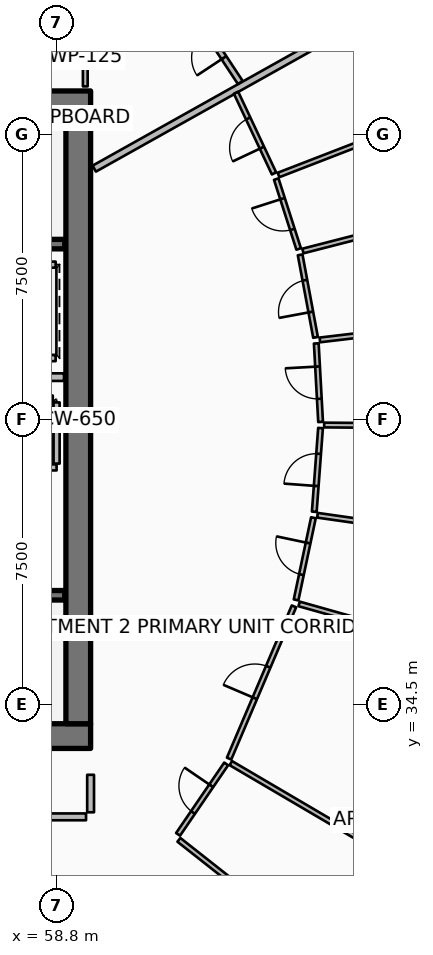
"""IFC4 building model, lengths in metres.
Left out: names, types, materials, properties, quantities, classifications, styles, units other than length and angle.
Written with IfcOpenShell. Run it as: python <this file> out.ifc"""

import sys

from ifc_helpers import new_model, si_unit, direction, frame, frame_2d, origin, place, context, subcontext, project, spatial, rectangle, extrude, element, fill, save


model = new_model("IFC4")
c1 = context("Model", 3, precision=1e-05, world=origin(), true_north=direction((0.0, 1.0)))
c2 = subcontext(c1, "Body", "Model", "MODEL_VIEW")
j1 = project(units=[si_unit("LENGTHUNIT", "METRE"), si_unit("PLANEANGLEUNIT", "RADIAN")], contexts=[c1])
p1 = place(None, origin())
s1 = spatial("IfcSite", under=j1, at=p1, CompositionType="ELEMENT")
p2 = place(p1, origin())
s2 = spatial("IfcBuilding", under=s1, at=p2, CompositionType="ELEMENT")
p3 = place(p2, frame((0.0, 0.0, 240.55)))
s3 = spatial("IfcBuildingStorey", under=s2, at=p3, CompositionType="ELEMENT", Elevation=240.55)
for number, where, z_axis, x_axis in (
    (1, (49.95, 33.675, 0.0), (0.0, 0.0, 1.0), (1.0, 0.0, 0.0)),
    (2, (49.95, 50.325, 0.0), (0.0, 0.0, 1.0), (1.0, 0.0, 0.0)),
):
    element("IfcWall", number, at=place(p3, frame(where, z_axis=z_axis, x_axis=x_axis)), inside=s3, PredefinedType="SHEAR", context=c2, shape_type="SweptSolid", body=[
        extrude(rectangle(XDim=9.75, YDim=0.65, at=frame_2d((4.875, 0.0))), origin(), (0.0, 0.0, 1.0), 3.85),
    ])
p4 = place(p3, frame((59.375, 34.0, 0.0), z_axis=(0.0, 0.0, 1.0), x_axis=(0.0, 1.0, 0.0)))
e3 = element("IfcWall", 3, at=p4, inside=s3, PredefinedType="SHEAR", context=c2, shape_type="SweptSolid", body=[
    extrude(rectangle(XDim=16.0, YDim=0.65, at=frame_2d((8.0, 0.0))), origin(), (0.0, 0.0, 1.0), 3.85),
])
p5 = place(p3, frame((51.48, 46.62, 0.0), z_axis=(0.0, 0.0, 1.0), x_axis=(1.0, 0.0, 0.0)))
e4 = element("IfcWall", 4, at=p5, inside=s3, PredefinedType="SOLIDWALL", context=c2, shape_type="SweptSolid", body=[
    extrude(rectangle(XDim=7.54, YDim=0.25, at=frame_2d((3.77, 0.0))), origin(), (0.0, 0.0, 1.0), 3.59),
])
p6 = place(p5, frame((0.3, 0.0, 0.0)))
e5 = element("IfcOpeningElement", 5, at=p6, cuts=e4, PredefinedType="OPENING", context=c2, shape_type="SweptSolid", body=[
    extrude(rectangle(XDim=1.55, YDim=2.15, at=frame_2d((0.775, 1.075))), frame((0.0, 0.135, 0.0), z_axis=(0.0, -1.0, 0.0), x_axis=(1.0, 0.0, 0.0)), (0.0, 0.0, 1.0), 0.27),
])
p7 = place(p3, frame((51.48, 37.38, 0.0), z_axis=(0.0, 0.0, 1.0), x_axis=(1.0, 0.0, 0.0)))
e6 = element("IfcWall", 6, at=p7, inside=s3, PredefinedType="SOLIDWALL", context=c2, shape_type="SweptSolid", body=[
    extrude(rectangle(XDim=7.54, YDim=0.25, at=frame_2d((3.77, 0.0))), origin(), (0.0, 0.0, 1.0), 3.59),
])
p8 = place(p7, frame((0.3, 0.0, 0.0)))
e7 = element("IfcOpeningElement", 7, at=p8, cuts=e6, PredefinedType="OPENING", context=c2, shape_type="SweptSolid", body=[
    extrude(rectangle(XDim=1.55, YDim=2.15, at=frame_2d((0.775, 1.075))), frame((0.0, 0.135, 0.0), z_axis=(0.0, -1.0, 0.0), x_axis=(1.0, 0.0, 0.0)), (0.0, 0.0, 1.0), 0.27),
])
p9 = place(p3, frame((58.805, 40.745, 0.0), z_axis=(0.0, 0.0, 1.0), x_axis=(-1.0, 0.0, 0.0)))
e8 = element("IfcWall", 8, at=p9, inside=s3, PredefinedType="PARTITIONING", context=c2, shape_type="SweptSolid", body=[
    extrude(rectangle(XDim=2.11, YDim=0.16, at=frame_2d((1.055, 0.0))), origin(), (0.0, 0.0, 1.0), 3.59),
])
p10 = place(p9, frame((0.505, 0.0, 0.0)))
e9 = element("IfcOpeningElement", 9, at=p10, cuts=e8, PredefinedType="OPENING", context=c2, shape_type="SweptSolid", body=[
    extrude(rectangle(XDim=1.1, YDim=2.1, at=frame_2d((0.55, 1.05))), frame((0.0, 0.09, 0.0), z_axis=(0.0, -1.0, 0.0), x_axis=(1.0, 0.0, 0.0)), (0.0, 0.0, 1.0), 0.18),
])
p11 = place(p3, frame((58.805, 40.845, 0.0), z_axis=(0.0, 0.0, 1.0), x_axis=(0.0, 1.0, 0.0)))
e10 = element("IfcWall", 10, at=p11, inside=s3, PredefinedType="PARTITIONING", context=c2, shape_type="SweptSolid", body=[
    extrude(rectangle(XDim=1.61, YDim=0.16, at=frame_2d((0.805, 0.0))), origin(), (0.0, 0.0, 1.0), 3.59),
])
p12 = place(p3, frame((56.795, 42.555, 0.0), z_axis=(0.0, 0.0, 1.0), x_axis=(1.0, 0.0, 0.0)))
e11 = element("IfcWall", 11, at=p12, inside=s3, PredefinedType="PARTITIONING", context=c2, shape_type="SweptSolid", body=[
    extrude(rectangle(XDim=1.91, YDim=0.16, at=frame_2d((0.955, 0.0))), origin(), (0.0, 0.0, 1.0), 3.59),
])
for number, where, z_axis, x_axis in (
    (12, (56.72, 46.08, 0.0), (0.0, 0.0, 1.0), (1.0, 0.0, 0.0)),
    (13, (56.72, 43.62, 0.0), (0.0, 0.0, 1.0), (1.0, 0.0, 0.0)),
):
    element("IfcWall", number, at=place(p3, frame(where, z_axis=z_axis, x_axis=x_axis)), inside=s3, PredefinedType="PARTITIONING", context=c2, shape_type="SweptSolid", body=[
        extrude(rectangle(XDim=2.06, YDim=0.16, at=frame_2d((1.03, 0.0))), origin(), (0.0, 0.0, 1.0), 3.59),
    ])
p13 = place(p3, frame((50.12, 43.12, 0.0), z_axis=(0.0, 0.0, 1.0), x_axis=(1.0, 0.0, 0.0)))
e14 = element("IfcWall", 14, at=p13, inside=s3, PredefinedType="PARTITIONING", context=c2, shape_type="SweptSolid", body=[
    extrude(rectangle(XDim=8.88, YDim=0.2, at=frame_2d((4.44, 0.0))), origin(), (0.0, 0.0, 1.0), 3.59),
])
p14 = place(p3, frame((59.56, 50.77, 0.0), z_axis=(0.0, 0.0, 1.0), x_axis=(0.0, 1.0, 0.0)))
e15 = element("IfcWall", 15, at=p14, inside=s3, PredefinedType="PARTITIONING", context=c2, shape_type="SweptSolid", body=[
    extrude(rectangle(XDim=1.54, YDim=0.125, at=frame_2d((0.77, 0.0))), origin(), (0.0, 0.0, 1.0), 3.03),
])
p15 = place(p3, frame((59.796, 48.606, 0.0), z_axis=(0.0, 0.0, 1.0), x_axis=(0.872493213488, 0.488626229767, 0.0)))
e16 = element("IfcWall", 16, at=p15, inside=s3, PredefinedType="PARTITIONING", context=c2, shape_type="SweptSolid", body=[
    extrude(rectangle(XDim=16.91, YDim=0.18, at=frame_2d((8.455, 0.0))), origin(), (0.0, 0.0, 1.0), 2.957),
])
p16 = place(p3, frame((63.639, 50.872, 0.0), z_axis=(0.0, 0.0, 1.0), x_axis=(-0.550539267926, 0.834809268319, 0.0)))
e17 = element("IfcWall", 17, at=p16, inside=s3, PredefinedType="PARTITIONING", context=c2, shape_type="SweptSolid", body=[
    extrude(rectangle(XDim=2.414, YDim=0.15, at=frame_2d((1.207, 0.0))), origin(), (0.0, 0.0, 1.0), 2.957),
])
p17 = place(p16, frame((0.782, 0.0, 0.0)))
e18 = element("IfcOpeningElement", 18, at=p17, cuts=e17, PredefinedType="OPENING", context=c2, shape_type="SweptSolid", body=[
    extrude(rectangle(XDim=0.85, YDim=2.06, at=frame_2d((0.425, 1.03))), frame((0.0, 0.085, 0.0), z_axis=(0.0, -1.0, 0.0), x_axis=(1.0, 0.0, 0.0)), (0.0, 0.0, 1.0), 0.17),
])
p18 = place(p3, frame((53.972, 31.55, 0.0), z_axis=(0.0, 0.0, 1.0), x_axis=(1.0, 0.0, 0.0)))
e19 = element("IfcWall", 19, at=p18, inside=s3, PredefinedType="PARTITIONING", context=c2, shape_type="SweptSolid", body=[
    extrude(rectangle(XDim=5.608, YDim=0.18, at=frame_2d((2.804, 0.0))), origin(), (0.0, 0.0, 1.0), 2.957),
])
p19 = place(p18, frame((2.254, 0.0, 0.0)))
e20 = element("IfcOpeningElement", 20, at=p19, cuts=e19, PredefinedType="OPENING", context=c2, shape_type="SweptSolid", body=[
    extrude(rectangle(XDim=1.1, YDim=2.1, at=frame_2d((0.55, 1.05))), frame((0.0, 0.1, 0.0), z_axis=(0.0, -1.0, 0.0), x_axis=(1.0, 0.0, 0.0)), (0.0, 0.0, 1.0), 0.2),
])
p20 = place(p3, frame((59.7, 31.67, 0.0), z_axis=(0.0, 0.0, 1.0), x_axis=(0.0, 1.0, 0.0)))
e21 = element("IfcWall", 21, at=p20, inside=s3, PredefinedType="PARTITIONING", context=c2, shape_type="SweptSolid", body=[
    extrude(rectangle(XDim=0.987, YDim=0.18, at=frame_2d((0.493, 0.0))), origin(), (0.0, 0.0, 1.0), 2.957),
])
p21 = place(p3, frame((62.023, 30.945, 0.0), z_axis=(0.0, 0.0, 1.0), x_axis=(0.785322102606, -0.619087388952, 0.0)))
e22 = element("IfcWall", 22, at=p21, inside=s3, PredefinedType="PARTITIONING", context=c2, shape_type="SweptSolid", body=[
    extrude(rectangle(XDim=9.228, YDim=0.125, at=frame_2d((4.614, 0.0))), origin(), (0.0, 0.0, 1.0), 2.957),
])
p22 = place(p3, frame((63.39, 32.963, 0.0), z_axis=(0.0, 0.0, 1.0), x_axis=(0.862331921897, -0.506343417532, 0.0)))
e23 = element("IfcWall", 23, at=p22, inside=s3, PredefinedType="PARTITIONING", context=c2, shape_type="SweptSolid", body=[
    extrude(rectangle(XDim=9.478, YDim=0.125, at=frame_2d((4.739, 0.0))), origin(), (0.0, 0.0, 1.0), 3.03),
])
p23 = place(p3, frame((62.001, 31.089, 0.0), z_axis=(0.0, 0.0, 1.0), x_axis=(0.564052095913, 0.825739204044, 0.0)))
e24 = element("IfcWall", 24, at=p23, inside=s3, PredefinedType="PARTITIONING", context=c2, shape_type="SweptSolid", body=[
    extrude(rectangle(XDim=2.245, YDim=0.125, at=frame_2d((1.122, 0.0))), origin(), (0.0, 0.0, 1.0), 2.957),
])
p24 = place(p23, frame((0.698, 0.0, 0.0)))
e25 = element("IfcOpeningElement", 25, at=p24, cuts=e24, PredefinedType="OPENING", context=c2, shape_type="SweptSolid", body=[
    extrude(rectangle(XDim=0.85, YDim=2.06, at=frame_2d((0.425, 1.03))), frame((0.0, 0.073, 0.0), z_axis=(0.0, -1.0, 0.0), x_axis=(1.0, 0.0, 0.0)), (0.0, 0.0, 1.0), 0.145),
])
p25 = place(p3, frame((63.344, 33.083, 0.0), z_axis=(0.0, 0.0, 1.0), x_axis=(0.392064212371, 0.919937852998, 0.0)))
e26 = element("IfcWall", 26, at=p25, inside=s3, PredefinedType="PARTITIONING", context=c2, shape_type="SweptSolid", body=[
    extrude(rectangle(XDim=4.354, YDim=0.125, at=frame_2d((2.177, 0.0))), origin(), (0.0, 0.0, 1.0), 2.957),
])
p26 = place(p25, frame((1.727, 0.0, 0.0)))
e27 = element("IfcOpeningElement", 27, at=p26, cuts=e26, PredefinedType="OPENING", context=c2, shape_type="SweptSolid", body=[
    extrude(rectangle(XDim=0.9, YDim=2.08, at=frame_2d((0.45, 1.04))), frame((0.0, 0.073, 0.0), z_axis=(0.0, -1.0, 0.0), x_axis=(1.0, 0.0, 0.0)), (0.0, 0.0, 1.0), 0.145),
])
p27 = place(p3, frame((65.187, 37.153, 0.0), z_axis=(0.0, 0.0, 1.0), x_axis=(0.962455577867, -0.271439239301, 0.0)))
e28 = element("IfcWall", 28, at=p27, inside=s3, PredefinedType="PARTITIONING", context=c2, shape_type="SweptSolid", body=[
    extrude(rectangle(XDim=11.639, YDim=0.125, at=frame_2d((5.819, 0.0))), origin(), (0.0, 0.0, 1.0), 2.957),
])
p28 = place(p3, frame((65.669, 39.485, 0.0), z_axis=(0.0, 0.0, 1.0), x_axis=(0.990022432034, -0.140909843761, 0.0)))
e29 = element("IfcWall", 29, at=p28, inside=s3, PredefinedType="PARTITIONING", context=c2, shape_type="SweptSolid", body=[
    extrude(rectangle(XDim=11.761, YDim=0.125, at=frame_2d((5.88, 0.0))), origin(), (0.0, 0.0, 1.0), 3.03),
])
p29 = place(p3, frame((65.846, 41.86, 0.0), z_axis=(0.0, 0.0, 1.0), x_axis=(0.999969162233, -0.007853316706, 0.0)))
e30 = element("IfcWall", 30, at=p29, inside=s3, PredefinedType="PARTITIONING", context=c2, shape_type="SweptSolid", body=[
    extrude(rectangle(XDim=12.311, YDim=0.125, at=frame_2d((6.155, 0.0))), origin(), (0.0, 0.0, 1.0), 3.03),
])
p30 = place(p3, frame((65.107, 37.258, 0.0), z_axis=(0.0, 0.0, 1.0), x_axis=(0.20677346991, 0.978388845062, 0.0)))
e31 = element("IfcWall", 31, at=p30, inside=s3, PredefinedType="PARTITIONING", context=c2, shape_type="SweptSolid", body=[
    extrude(rectangle(XDim=2.209, YDim=0.125, at=frame_2d((1.104, 0.0))), origin(), (0.0, 0.0, 1.0), 2.957),
])
p31 = place(p30, frame((0.68, 0.0, 0.0)))
e32 = element("IfcOpeningElement", 32, at=p31, cuts=e31, PredefinedType="OPENING", context=c2, shape_type="SweptSolid", body=[
    extrude(rectangle(XDim=0.85, YDim=2.06, at=frame_2d((0.425, 1.03))), frame((0.0, 0.073, 0.0), z_axis=(0.0, -1.0, 0.0), x_axis=(1.0, 0.0, 0.0)), (0.0, 0.0, 1.0), 0.145),
])
p32 = place(p3, frame((65.586, 39.578, 0.0), z_axis=(0.0, 0.0, 1.0), x_axis=(0.074490462528, 0.997221726093, 0.0)))
e33 = element("IfcWall", 33, at=p32, inside=s3, PredefinedType="PARTITIONING", context=c2, shape_type="SweptSolid", body=[
    extrude(rectangle(XDim=2.209, YDim=0.125, at=frame_2d((1.104, 0.0))), origin(), (0.0, 0.0, 1.0), 3.03),
])
p33 = place(p32, frame((0.679, 0.0, 0.0)))
e34 = element("IfcOpeningElement", 34, at=p33, cuts=e33, PredefinedType="OPENING", context=c2, shape_type="SweptSolid", body=[
    extrude(rectangle(XDim=0.85, YDim=2.06, at=frame_2d((0.425, 1.03))), frame((0.0, 0.073, 0.0), z_axis=(0.0, -1.0, 0.0), x_axis=(1.0, 0.0, 0.0)), (0.0, 0.0, 1.0), 0.145),
])
p34 = place(p3, frame((65.752, 41.94, 0.0), z_axis=(0.0, 0.0, 1.0), x_axis=(-0.055084577693, 0.998481692021, 0.0)))
e35 = element("IfcWall", 35, at=p34, inside=s3, PredefinedType="PARTITIONING", context=c2, shape_type="SweptSolid", body=[
    extrude(rectangle(XDim=2.07, YDim=0.125, at=frame_2d((1.035, 0.0))), origin(), (0.0, 0.0, 1.0), 2.957),
])
p35 = place(p34, frame((0.61, 0.0, 0.0)))
e36 = element("IfcOpeningElement", 36, at=p35, cuts=e35, PredefinedType="OPENING", context=c2, shape_type="SweptSolid", body=[
    extrude(rectangle(XDim=0.85, YDim=2.06, at=frame_2d((0.425, 1.03))), frame((0.0, 0.073, 0.0), z_axis=(0.0, -1.0, 0.0), x_axis=(1.0, 0.0, 0.0)), (0.0, 0.0, 1.0), 0.145),
])
p36 = place(p3, frame((65.733, 44.099, 0.0), z_axis=(0.0, 0.0, 1.0), x_axis=(0.99306831242, 0.117538618625, 0.0)))
e37 = element("IfcWall", 37, at=p36, inside=s3, PredefinedType="PARTITIONING", context=c2, shape_type="SweptSolid", body=[
    extrude(rectangle(XDim=12.573, YDim=0.125, at=frame_2d((6.286, 0.0))), origin(), (0.0, 0.0, 1.0), 2.957),
])
p37 = place(p3, frame((65.286, 46.438, 0.0), z_axis=(0.0, 0.0, 1.0), x_axis=(0.968583991447, 0.248686653265, 0.0)))
e38 = element("IfcWall", 38, at=p37, inside=s3, PredefinedType="PARTITIONING", context=c2, shape_type="SweptSolid", body=[
    extrude(rectangle(XDim=12.056, YDim=0.125, at=frame_2d((6.028, 0.0))), origin(), (0.0, 0.0, 1.0), 3.03),
])
p38 = place(p3, frame((64.645, 48.439, 0.0), z_axis=(0.0, 0.0, 1.0), x_axis=(0.93263897003, 0.360810963778, 0.0)))
e39 = element("IfcWall", 39, at=p38, inside=s3, PredefinedType="PARTITIONING", context=c2, shape_type="SweptSolid", body=[
    extrude(rectangle(XDim=12.043, YDim=0.125, at=frame_2d((6.021, 0.0))), origin(), (0.0, 0.0, 1.0), 3.03),
])
p39 = place(p3, frame((65.619, 44.166, 0.0), z_axis=(0.0, 0.0, 1.0), x_axis=(-0.183454395516, 0.983028221755, 0.0)))
e40 = element("IfcWall", 40, at=p39, inside=s3, PredefinedType="PARTITIONING", context=c2, shape_type="SweptSolid", body=[
    extrude(rectangle(XDim=2.209, YDim=0.125, at=frame_2d((1.104, 0.0))), origin(), (0.0, 0.0, 1.0), 2.957),
])
p40 = place(p39, frame((0.68, 0.0, 0.0)))
e41 = element("IfcOpeningElement", 41, at=p40, cuts=e40, PredefinedType="OPENING", context=c2, shape_type="SweptSolid", body=[
    extrude(rectangle(XDim=0.85, YDim=2.06, at=frame_2d((0.425, 1.03))), frame((0.0, 0.073, 0.0), z_axis=(0.0, -1.0, 0.0), x_axis=(1.0, 0.0, 0.0)), (0.0, 0.0, 1.0), 0.145),
])
p41 = place(p3, frame((65.175, 46.492, 0.0), z_axis=(0.0, 0.0, 1.0), x_axis=(-0.305358332679, 0.952237516938, 0.0)))
e42 = element("IfcWall", 42, at=p41, inside=s3, PredefinedType="PARTITIONING", context=c2, shape_type="SweptSolid", body=[
    extrude(rectangle(XDim=1.931, YDim=0.125, at=frame_2d((0.965, 0.0))), origin(), (0.0, 0.0, 1.0), 3.03),
])
p42 = place(p41, frame((0.54, 0.0, 0.0)))
e43 = element("IfcOpeningElement", 43, at=p42, cuts=e42, PredefinedType="OPENING", context=c2, shape_type="SweptSolid", body=[
    extrude(rectangle(XDim=0.85, YDim=2.06, at=frame_2d((0.425, 1.03))), frame((0.0, 0.073, 0.0), z_axis=(0.0, -1.0, 0.0), x_axis=(1.0, 0.0, 0.0)), (0.0, 0.0, 1.0), 0.145),
])
p43 = place(p3, frame((64.527, 48.479, 0.0), z_axis=(0.0, 0.0, 1.0), x_axis=(-0.425751972865, 0.904839907167, 0.0)))
e44 = element("IfcWall", 44, at=p43, inside=s3, PredefinedType="PARTITIONING", context=c2, shape_type="SweptSolid", body=[
    extrude(rectangle(XDim=2.348, YDim=0.125, at=frame_2d((1.174, 0.0))), origin(), (0.0, 0.0, 1.0), 2.957),
])
p44 = place(p43, frame((0.749, 0.0, 0.0)))
e45 = element("IfcOpeningElement", 45, at=p44, cuts=e44, PredefinedType="OPENING", context=c2, shape_type="SweptSolid", body=[
    extrude(rectangle(XDim=0.85, YDim=2.06, at=frame_2d((0.425, 1.03))), frame((0.0, 0.073, 0.0), z_axis=(0.0, -1.0, 0.0), x_axis=(1.0, 0.0, 0.0)), (0.0, 0.0, 1.0), 0.145),
])
p45 = place(p17, origin())
e46 = element("IfcDoor", 46, at=p45, inside=s3, OperationType="SINGLE_SWING_LEFT", PredefinedType="DOOR", context=c2, shape_type="SweptSolid", body=[
    extrude(rectangle(XDim=0.85, YDim=2.06, at=frame_2d((0.425, 1.03))), frame((0.0, 0.025, 0.0), z_axis=(0.0, -1.0, 0.0), x_axis=(1.0, 0.0, 0.0)), (0.0, 0.0, 1.0), 0.05),
])
fill(e18, e46)
p46 = place(p24, origin())
e47 = element("IfcDoor", 47, at=p46, inside=s3, OperationType="SINGLE_SWING_RIGHT", PredefinedType="DOOR", context=c2, shape_type="SweptSolid", body=[
    extrude(rectangle(XDim=0.85, YDim=2.06, at=frame_2d((0.425, 1.03))), frame((0.0, 0.025, 0.0), z_axis=(0.0, -1.0, 0.0), x_axis=(1.0, 0.0, 0.0)), (0.0, 0.0, 1.0), 0.05),
])
fill(e25, e47)
p47 = place(p26, origin())
e48 = element("IfcDoor", 48, at=p47, inside=s3, OperationType="SINGLE_SWING_LEFT", PredefinedType="DOOR", context=c2, shape_type="SweptSolid", body=[
    extrude(rectangle(XDim=0.9, YDim=2.08, at=frame_2d((0.45, 1.04))), frame((0.0, 0.025, 0.0), z_axis=(0.0, -1.0, 0.0), x_axis=(1.0, 0.0, 0.0)), (0.0, 0.0, 1.0), 0.05),
])
fill(e27, e48)
p48 = place(p31, origin())
e49 = element("IfcDoor", 49, at=p48, inside=s3, OperationType="SINGLE_SWING_RIGHT", PredefinedType="DOOR", context=c2, shape_type="SweptSolid", body=[
    extrude(rectangle(XDim=0.85, YDim=2.06, at=frame_2d((0.425, 1.03))), frame((0.0, 0.025, 0.0), z_axis=(0.0, -1.0, 0.0), x_axis=(1.0, 0.0, 0.0)), (0.0, 0.0, 1.0), 0.05),
])
fill(e32, e49)
p49 = place(p33, origin())
e50 = element("IfcDoor", 50, at=p49, inside=s3, OperationType="SINGLE_SWING_LEFT", PredefinedType="DOOR", context=c2, shape_type="SweptSolid", body=[
    extrude(rectangle(XDim=0.85, YDim=2.06, at=frame_2d((0.425, 1.03))), frame((0.0, 0.025, 0.0), z_axis=(0.0, -1.0, 0.0), x_axis=(1.0, 0.0, 0.0)), (0.0, 0.0, 1.0), 0.05),
])
fill(e34, e50)
p50 = place(p35, origin())
e51 = element("IfcDoor", 51, at=p50, inside=s3, OperationType="SINGLE_SWING_RIGHT", PredefinedType="DOOR", context=c2, shape_type="SweptSolid", body=[
    extrude(rectangle(XDim=0.85, YDim=2.06, at=frame_2d((0.425, 1.03))), frame((0.0, 0.025, 0.0), z_axis=(0.0, -1.0, 0.0), x_axis=(1.0, 0.0, 0.0)), (0.0, 0.0, 1.0), 0.05),
])
fill(e36, e51)
p51 = place(p40, origin())
e52 = element("IfcDoor", 52, at=p51, inside=s3, OperationType="SINGLE_SWING_LEFT", PredefinedType="DOOR", context=c2, shape_type="SweptSolid", body=[
    extrude(rectangle(XDim=0.85, YDim=2.06, at=frame_2d((0.425, 1.03))), frame((0.0, 0.025, 0.0), z_axis=(0.0, -1.0, 0.0), x_axis=(1.0, 0.0, 0.0)), (0.0, 0.0, 1.0), 0.05),
])
fill(e41, e52)
p52 = place(p42, origin())
e53 = element("IfcDoor", 53, at=p52, inside=s3, OperationType="SINGLE_SWING_RIGHT", PredefinedType="DOOR", context=c2, shape_type="SweptSolid", body=[
    extrude(rectangle(XDim=0.85, YDim=2.06, at=frame_2d((0.425, 1.03))), frame((0.0, 0.025, 0.0), z_axis=(0.0, -1.0, 0.0), x_axis=(1.0, 0.0, 0.0)), (0.0, 0.0, 1.0), 0.05),
])
fill(e43, e53)
p53 = place(p44, origin())
e54 = element("IfcDoor", 54, at=p53, inside=s3, OperationType="SINGLE_SWING_LEFT", PredefinedType="DOOR", context=c2, shape_type="SweptSolid", body=[
    extrude(rectangle(XDim=0.85, YDim=2.06, at=frame_2d((0.425, 1.03))), frame((0.0, 0.025, 0.0), z_axis=(0.0, -1.0, 0.0), x_axis=(1.0, 0.0, 0.0)), (0.0, 0.0, 1.0), 0.05),
])
fill(e45, e54)
save(model, sys.argv[1])
